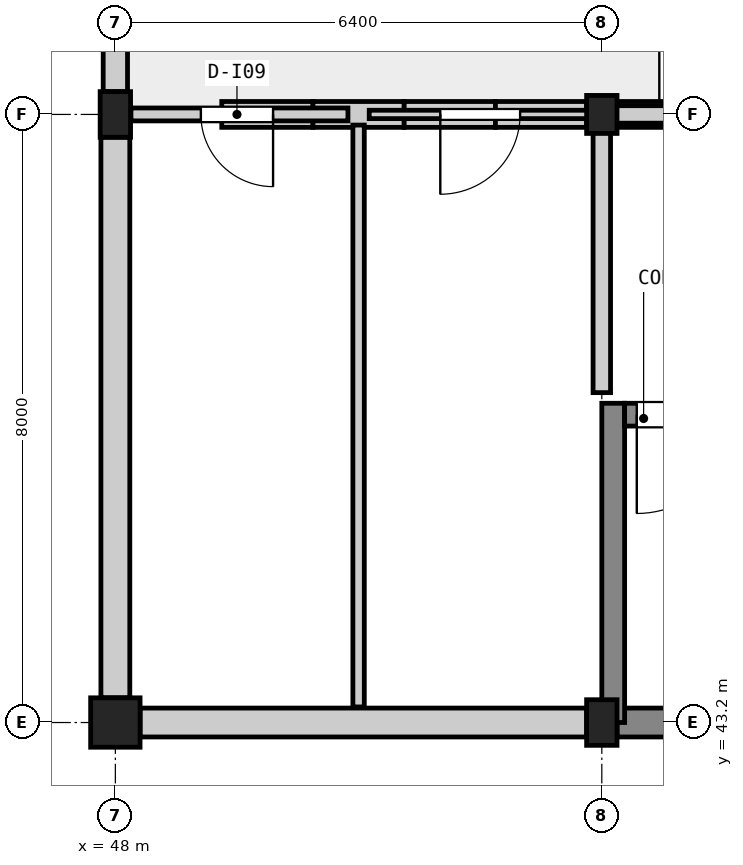
"""IFC4 building model, lengths in metres.
Left out: names, types, materials, properties, quantities, classifications, styles, units other than length and angle.
Written with IfcOpenShell. Run it as: python <this file> out.ifc"""

import sys

from ifc_helpers import new_model, si_unit, direction, frame, frame_2d, origin, origin_2d, place, context, subcontext, project, spatial, rectangle, extrude, element, fill, save


model = new_model("IFC4")
c1 = context("Model", 3, precision=1e-05, world=origin(), true_north=direction((0.0, 1.0)))
c2 = subcontext(c1, "Body", "Model", "MODEL_VIEW")
j1 = project(units=[si_unit("LENGTHUNIT", "METRE"), si_unit("PLANEANGLEUNIT", "RADIAN")], contexts=[c1])
p1 = place(None, origin())
s1 = spatial("IfcSite", under=j1, at=p1, CompositionType="ELEMENT")
p2 = place(p1, origin())
s2 = spatial("IfcBuilding", under=s1, at=p2, CompositionType="ELEMENT")
p3 = place(p2, frame((0.0, 0.0, 15.6)))
s3 = spatial("IfcBuildingStorey", under=s2, at=p3, CompositionType="ELEMENT", Elevation=15.6)
p4 = place(p3, frame((48.0, 43.2, 0.0), z_axis=(0.0, 0.0, 1.0), x_axis=(1.0, 0.0, 0.0)))
e1 = element("IfcColumn", 1, at=p4, inside=s3, PredefinedType="COLUMN", context=c2, shape_type="SweptSolid", body=[
    extrude(rectangle(XDim=0.65, YDim=0.65, at=origin_2d()), origin(), (0.0, 0.0, 1.0), 4.2),
])
for number, where, z_axis, x_axis in (
    (2, (48.0, 51.2, 0.0), (0.0, 0.0, 1.0), (1.0, 0.0, 0.0)),
    (3, (54.4, 43.2, 0.0), (0.0, 0.0, 1.0), (1.0, 0.0, 0.0)),
):
    element("IfcColumn", number, at=place(p3, frame(where, z_axis=z_axis, x_axis=x_axis)), inside=s3, PredefinedType="COLUMN", context=c2, shape_type="SweptSolid", body=[
        extrude(rectangle(XDim=0.4, YDim=0.6, at=origin_2d()), origin(), (0.0, 0.0, 1.0), 4.2),
    ])
p5 = place(p3, frame((54.4, 51.2, 0.0), z_axis=(0.0, 0.0, 1.0), x_axis=(1.0, 0.0, 0.0)))
e4 = element("IfcColumn", 4, at=p5, inside=s3, PredefinedType="COLUMN", context=c2, shape_type="SweptSolid", body=[
    extrude(rectangle(XDim=0.4, YDim=0.5, at=origin_2d()), origin(), (0.0, 0.0, 1.0), 4.2),
])
p6 = place(p3, frame((48.325, 43.2, 0.0), z_axis=(0.0, 0.0, 1.0), x_axis=(1.0, 0.0, 0.0)))
e5 = element("IfcWall", 5, at=p6, inside=s3, PredefinedType="SOLIDWALL", context=c2, shape_type="SweptSolid", body=[
    extrude(rectangle(XDim=5.875, YDim=0.38, at=frame_2d((2.938, 0.0))), origin(), (0.0, 0.0, 1.0), 3.3),
])
p7 = place(p3, frame((54.6, 43.2, 0.0), z_axis=(0.0, 0.0, 1.0), x_axis=(1.0, 0.0, 0.0)))
e6 = element("IfcWall", 6, at=p7, inside=s3, PredefinedType="SOLIDWALL", context=c2, shape_type="SweptSolid", body=[
    extrude(rectangle(XDim=7.6, YDim=0.38, at=frame_2d((3.8, 0.0))), origin(), (0.0, 0.0, 1.0), 3.295),
])
p8 = place(p7, frame((2.975, 0.0, 0.9)))
e7 = element("IfcOpeningElement", 7, at=p8, cuts=e6, PredefinedType="OPENING", context=c2, shape_type="SweptSolid", body=[
    extrude(rectangle(XDim=1.65, YDim=2.2, at=frame_2d((0.825, 1.1))), frame((0.0, 0.202, 0.0), z_axis=(0.0, -1.0, 0.0), x_axis=(1.0, 0.0, 0.0)), (0.0, 0.0, 1.0), 0.404),
])
p9 = place(p3, frame((48.0, 58.95, 0.0), z_axis=(0.0, 0.0, 1.0), x_axis=(0.0, -1.0, 0.0)))
e8 = element("IfcWall", 8, at=p9, inside=s3, PredefinedType="SOLIDWALL", context=c2, shape_type="SweptSolid", body=[
    extrude(rectangle(XDim=7.45, YDim=0.32, at=frame_2d((3.725, 0.0))), origin(), (0.0, 0.0, 1.0), 3.3),
])
p10 = place(p9, frame((3.375, 0.0, 0.9)))
e9 = element("IfcOpeningElement", 9, at=p10, cuts=e8, PredefinedType="OPENING", context=c2, shape_type="SweptSolid", body=[
    extrude(rectangle(XDim=2.4, YDim=2.2, at=frame_2d((1.2, 1.1))), frame((0.0, 0.172, 0.0), z_axis=(0.0, -1.0, 0.0), x_axis=(1.0, 0.0, 0.0)), (0.0, 0.0, 1.0), 0.344),
])
p11 = place(p3, frame((48.0, 50.9, 0.0), z_axis=(0.0, 0.0, 1.0), x_axis=(0.0, -1.0, 0.0)))
e10 = element("IfcWall", 10, at=p11, inside=s3, PredefinedType="SOLIDWALL", context=c2, shape_type="SweptSolid", body=[
    extrude(rectangle(XDim=7.375, YDim=0.38, at=frame_2d((3.688, 0.0))), origin(), (0.0, 0.0, 1.0), 3.3),
])
p12 = place(p3, frame((49.4, 51.2, 4.2), z_axis=(0.0, 0.0, 1.0), x_axis=(1.0, 0.0, 0.0)))
e11 = element("IfcWall", 11, at=p12, inside=s3, PredefinedType="SOLIDWALL", context=c2, shape_type="SweptSolid", body=[
    extrude(rectangle(XDim=1.2, YDim=0.34, at=frame_2d((0.6, 0.0))), origin(), (0.0, 0.0, 1.0), 0.375),
])
p13 = place(p3, frame((50.6, 51.2, 4.2), z_axis=(0.0, 0.0, 1.0), x_axis=(1.0, 0.0, 0.0)))
e12 = element("IfcWall", 12, at=p13, inside=s3, PredefinedType="SOLIDWALL", context=c2, shape_type="SweptSolid", body=[
    extrude(rectangle(XDim=1.2, YDim=0.34, at=frame_2d((0.6, 0.0))), origin(), (0.0, 0.0, 1.0), 0.697),
])
p14 = place(p3, frame((51.8, 51.2, 4.2), z_axis=(0.0, 0.0, 1.0), x_axis=(1.0, 0.0, 0.0)))
e13 = element("IfcWall", 13, at=p14, inside=s3, PredefinedType="SOLIDWALL", context=c2, shape_type="SweptSolid", body=[
    extrude(rectangle(XDim=1.2, YDim=0.34, at=frame_2d((0.6, 0.0))), origin(), (0.0, 0.0, 1.0), 1.018),
])
p15 = place(p3, frame((53.0, 51.2, 4.2), z_axis=(0.0, 0.0, 1.0), x_axis=(1.0, 0.0, 0.0)))
e14 = element("IfcWall", 14, at=p15, inside=s3, PredefinedType="SOLIDWALL", context=c2, shape_type="SweptSolid", body=[
    extrude(rectangle(XDim=1.2, YDim=0.34, at=frame_2d((0.6, 0.0))), origin(), (0.0, 0.0, 1.0), 1.34),
])
p16 = place(p3, frame((54.6, 51.2, 4.2), z_axis=(0.0, 0.0, 1.0), x_axis=(1.0, 0.0, 0.0)))
e15 = element("IfcWall", 15, at=p16, inside=s3, PredefinedType="SOLIDWALL", context=c2, shape_type="SweptSolid", body=[
    extrude(rectangle(XDim=1.229, YDim=0.34, at=frame_2d((0.615, 0.0))), origin(), (0.0, 0.0, 1.0), 1.76),
])
p17 = place(p3, frame((54.55, 43.2, 0.0), z_axis=(0.0, 0.0, 1.0), x_axis=(0.0, 1.0, 0.0)))
e16 = element("IfcWall", 16, at=p17, inside=s3, PredefinedType="SHEAR", context=c2, shape_type="SweptSolid", body=[
    extrude(rectangle(XDim=4.2, YDim=0.3, at=frame_2d((2.1, 0.0))), origin(), (0.0, 0.0, 1.0), 3.9),
])
p18 = place(p3, frame((54.7, 47.25, 0.0), z_axis=(0.0, 0.0, 1.0), x_axis=(1.0, 0.0, 0.0)))
e17 = element("IfcWall", 17, at=p18, inside=s3, PredefinedType="SHEAR", context=c2, shape_type="SweptSolid", body=[
    extrude(rectangle(XDim=7.4, YDim=0.3, at=frame_2d((3.7, 0.0))), origin(), (0.0, 0.0, 1.0), 3.9),
])
p19 = place(p18, frame((0.16, 0.0, 0.0)))
e18 = element("IfcOpeningElement", 18, at=p19, cuts=e17, PredefinedType="OPENING", context=c2, shape_type="SweptSolid", body=[
    extrude(rectangle(XDim=1.3, YDim=2.18, at=frame_2d((0.65, 1.09))), frame((0.0, 0.162, 0.0), z_axis=(0.0, -1.0, 0.0), x_axis=(1.0, 0.0, 0.0)), (0.0, 0.0, 1.0), 0.324),
])
p20 = place(p3, frame((54.54, 51.2, 0.0), z_axis=(0.0, 0.0, 1.0), x_axis=(1.0, 0.0, 0.0)))
e19 = element("IfcWall", 19, at=p20, inside=s3, PredefinedType="SOLIDWALL", context=c2, shape_type="SweptSolid", body=[
    extrude(rectangle(XDim=7.755, YDim=0.23, at=frame_2d((3.877, 0.0))), origin(), (0.0, 0.0, 1.0), 3.35),
])
p21 = place(p20, frame((3.56, 0.0, 0.0)))
e20 = element("IfcOpeningElement", 20, at=p21, cuts=e19, PredefinedType="OPENING", context=c2, shape_type="SweptSolid", body=[
    extrude(rectangle(XDim=1.4, YDim=2.2, at=frame_2d((0.7, 1.1))), frame((0.0, 0.127, 0.0), z_axis=(0.0, -1.0, 0.0), x_axis=(1.0, 0.0, 0.0)), (0.0, 0.0, 1.0), 0.254),
])
p22 = place(p3, frame((54.4, 47.54, 0.0), z_axis=(0.0, 0.0, 1.0), x_axis=(0.0, 1.0, 0.0)))
e21 = element("IfcWall", 21, at=p22, inside=s3, PredefinedType="SOLIDWALL", context=c2, shape_type="SweptSolid", body=[
    extrude(rectangle(XDim=3.52, YDim=0.23, at=frame_2d((1.76, 0.0))), origin(), (0.0, 0.0, 1.0), 3.045),
])
p23 = place(p3, frame((48.205, 51.2, 0.0), z_axis=(0.0, 0.0, 1.0), x_axis=(1.0, 0.0, 0.0)))
e22 = element("IfcWall", 22, at=p23, inside=s3, PredefinedType="PARTITIONING", context=c2, shape_type="SweptSolid", body=[
    extrude(rectangle(XDim=2.855, YDim=0.17, at=frame_2d((1.427, 0.0))), origin(), (0.0, 0.0, 1.0), 3.35),
])
p24 = place(p23, frame((0.92, 0.0, 0.0)))
e23 = element("IfcOpeningElement", 23, at=p24, cuts=e22, PredefinedType="OPENING", context=c2, shape_type="SweptSolid", body=[
    extrude(rectangle(XDim=0.95, YDim=2.15, at=frame_2d((0.475, 1.075))), frame((0.0, 0.097, 0.0), z_axis=(0.0, -1.0, 0.0), x_axis=(1.0, 0.0, 0.0)), (0.0, 0.0, 1.0), 0.194),
])
p25 = place(p3, frame((51.2, 43.405, 0.0), z_axis=(0.0, 0.0, 1.0), x_axis=(0.0, 1.0, 0.0)))
e24 = element("IfcWall", 24, at=p25, inside=s3, PredefinedType="PARTITIONING", context=c2, shape_type="SweptSolid", body=[
    extrude(rectangle(XDim=7.655, YDim=0.15, at=frame_2d((3.828, 0.0))), origin(), (0.0, 0.0, 1.0), 3.9),
])
p26 = place(p3, frame((51.34, 51.2, 0.0), z_axis=(0.0, 0.0, 1.0), x_axis=(1.0, 0.0, 0.0)))
e25 = element("IfcWall", 25, at=p26, inside=s3, PredefinedType="PARTITIONING", context=c2, shape_type="SweptSolid", body=[
    extrude(rectangle(XDim=2.92, YDim=0.11, at=frame_2d((1.46, 0.0))), origin(), (0.0, 0.0, 1.0), 3.35),
])
p27 = place(p26, frame((0.935, 0.0, 0.0)))
e26 = element("IfcOpeningElement", 26, at=p27, cuts=e25, PredefinedType="OPENING", context=c2, shape_type="SweptSolid", body=[
    extrude(rectangle(XDim=1.05, YDim=2.15, at=frame_2d((0.525, 1.075))), frame((0.0, 0.067, 0.0), z_axis=(0.0, -1.0, 0.0), x_axis=(1.0, 0.0, 0.0)), (0.0, 0.0, 1.0), 0.134),
])
p28 = place(p19, frame((1.3, 0.0, 0.0), z_axis=(0.0, 0.0, 1.0), x_axis=(-1.0, 0.0, 0.0)))
e27 = element("IfcDoor", 27, at=p28, inside=s3, OperationType="SINGLE_SWING_RIGHT", PredefinedType="DOOR", context=c2, shape_type="SweptSolid", body=[
    extrude(rectangle(XDim=1.3, YDim=2.18, at=frame_2d((0.65, 1.09))), frame((0.0, 0.025, 0.0), z_axis=(0.0, -1.0, 0.0), x_axis=(1.0, 0.0, 0.0)), (0.0, 0.0, 1.0), 0.05),
])
fill(e18, e27)
p29 = place(p24, frame((0.95, 0.0, 0.0), z_axis=(0.0, 0.0, 1.0), x_axis=(-1.0, 0.0, 0.0)))
e28 = element("IfcDoor", 28, at=p29, inside=s3, OperationType="SINGLE_SWING_LEFT", PredefinedType="DOOR", context=c2, shape_type="SweptSolid", body=[
    extrude(rectangle(XDim=0.95, YDim=2.15, at=frame_2d((0.475, 1.075))), frame((0.0, 0.025, 0.0), z_axis=(0.0, -1.0, 0.0), x_axis=(1.0, 0.0, 0.0)), (0.0, 0.0, 1.0), 0.05),
])
fill(e23, e28)
p30 = place(p27, frame((1.05, 0.0, 0.0), z_axis=(0.0, 0.0, 1.0), x_axis=(-1.0, 0.0, 0.0)))
e29 = element("IfcDoor", 29, at=p30, inside=s3, OperationType="SINGLE_SWING_RIGHT", PredefinedType="DOOR", context=c2, shape_type="SweptSolid", body=[
    extrude(rectangle(XDim=1.05, YDim=2.15, at=frame_2d((0.525, 1.075))), frame((0.0, 0.025, 0.0), z_axis=(0.0, -1.0, 0.0), x_axis=(1.0, 0.0, 0.0)), (0.0, 0.0, 1.0), 0.05),
])
fill(e26, e29)
save(model, sys.argv[1])
